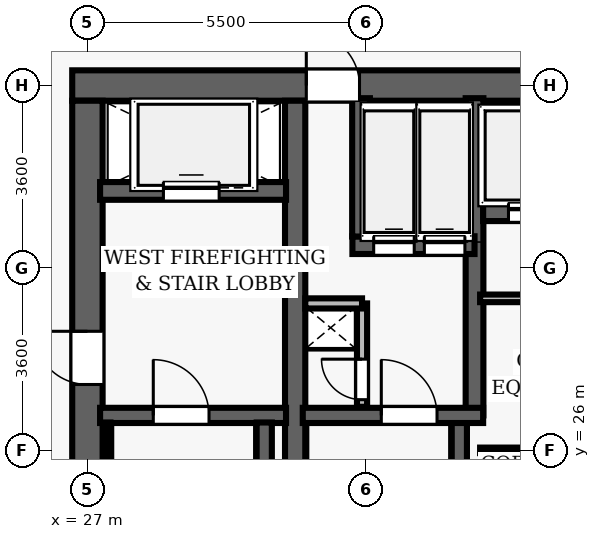
"""IFC4 building model, lengths in metres.
Left out: names, types, materials, properties, quantities, classifications, styles, units other than length and angle.
Written with IfcOpenShell. Run it as: python <this file> out.ifc"""

import sys

from ifc_helpers import new_model, si_unit, direction, frame, frame_2d, origin, place, context, subcontext, project, spatial, rectangle, extrude, element, fill, save


model = new_model("IFC4")
c1 = context("Model", 3, precision=1e-05, world=origin(), true_north=direction((0.0, 1.0)))
c2 = subcontext(c1, "Body", "Model", "MODEL_VIEW")
j1 = project(units=[si_unit("LENGTHUNIT", "METRE"), si_unit("PLANEANGLEUNIT", "RADIAN")], contexts=[c1])
p1 = place(None, origin())
s1 = spatial("IfcSite", under=j1, at=p1, CompositionType="ELEMENT")
p2 = place(p1, origin())
s2 = spatial("IfcBuilding", under=s1, at=p2, CompositionType="ELEMENT")
p3 = place(p2, frame((0.0, 0.0, 79.9)))
s3 = spatial("IfcBuildingStorey", under=s2, at=p3, CompositionType="ELEMENT", Elevation=79.9)
p4 = place(p3, frame((26.7, 33.2, 0.0), z_axis=(0.0, 0.0, 1.0), x_axis=(1.0, 0.0, 0.0)))
e1 = element("IfcWall", 1, at=p4, inside=s3, PredefinedType="SHEAR", context=c2, shape_type="SweptSolid", body=[
    extrude(rectangle(XDim=22.6, YDim=0.6, at=frame_2d((11.3, 0.0))), origin(), (0.0, 0.0, 1.0), 3.5),
])
p5 = place(p4, frame((4.62, 0.0, 0.0)))
e2 = element("IfcOpeningElement", 2, at=p5, cuts=e1, PredefinedType="OPENING", context=c2, shape_type="SweptSolid", body=[
    extrude(rectangle(XDim=1.05, YDim=2.15, at=frame_2d((0.525, 1.075))), frame((0.0, 0.31, 0.0), z_axis=(0.0, -1.0, 0.0), x_axis=(1.0, 0.0, 0.0)), (0.0, 0.0, 1.0), 0.62),
])
p6 = place(p4, frame((14.52, 0.0, 0.0)))
e3 = element("IfcOpeningElement", 3, at=p6, cuts=e1, PredefinedType="OPENING", context=c2, shape_type="SweptSolid", body=[
    extrude(rectangle(XDim=1.05, YDim=2.15, at=frame_2d((0.525, 1.075))), frame((0.0, 0.31, 0.0), z_axis=(0.0, -1.0, 0.0), x_axis=(1.0, 0.0, 0.0)), (0.0, 0.0, 1.0), 0.62),
])
p7 = place(p3, frame((27.0, 19.1, 0.0), z_axis=(0.0, 0.0, 1.0), x_axis=(0.0, 1.0, 0.0)))
e4 = element("IfcWall", 4, at=p7, inside=s3, PredefinedType="SHEAR", context=c2, shape_type="SweptSolid", body=[
    extrude(rectangle(XDim=13.8, YDim=0.6, at=frame_2d((6.9, 0.0))), origin(), (0.0, 0.0, 1.0), 3.5),
])
p8 = place(p7, frame((8.2, 0.0, 0.0)))
e5 = element("IfcOpeningElement", 5, at=p8, cuts=e4, PredefinedType="OPENING", context=c2, shape_type="SweptSolid", body=[
    extrude(rectangle(XDim=1.05, YDim=2.15, at=frame_2d((0.525, 1.075))), frame((0.0, 0.31, 0.0), z_axis=(0.0, -1.0, 0.0), x_axis=(1.0, 0.0, 0.0)), (0.0, 0.0, 1.0), 0.62),
])
p9 = place(p3, frame((31.1, 19.1, 0.0), z_axis=(0.0, 0.0, 1.0), x_axis=(0.0, 1.0, 0.0)))
e6 = element("IfcWall", 6, at=p9, inside=s3, PredefinedType="SHEAR", context=c2, shape_type="SweptSolid", body=[
    extrude(rectangle(XDim=13.8, YDim=0.4, at=frame_2d((6.9, 0.0))), origin(), (0.0, 0.0, 1.0), 3.5),
])
p10 = place(p3, frame((27.25, 26.69, 0.0), z_axis=(0.0, 0.0, 1.0), x_axis=(1.0, 0.0, 0.0)))
e7 = element("IfcWall", 7, at=p10, inside=s3, PredefinedType="SHEAR", context=c2, shape_type="SweptSolid", body=[
    extrude(rectangle(XDim=3.67, YDim=0.3, at=frame_2d((1.835, 0.0))), origin(), (0.0, 0.0, 1.0), 3.5),
])
p11 = place(p10, frame((1.05, 0.0, 0.0)))
e8 = element("IfcOpeningElement", 8, at=p11, cuts=e7, PredefinedType="OPENING", context=c2, shape_type="SweptSolid", body=[
    extrude(rectangle(XDim=1.1, YDim=2.15, at=frame_2d((0.55, 1.075))), frame((0.0, 0.16, 0.0), z_axis=(0.0, -1.0, 0.0), x_axis=(1.0, 0.0, 0.0)), (0.0, 0.0, 1.0), 0.32),
])
p12 = place(p3, frame((30.49, 19.05, 0.0), z_axis=(0.0, 0.0, 1.0), x_axis=(0.0, 1.0, 0.0)))
e9 = element("IfcWall", 9, at=p12, inside=s3, PredefinedType="SHEAR", context=c2, shape_type="SweptSolid", body=[
    extrude(rectangle(XDim=7.5, YDim=0.3, at=frame_2d((3.75, 0.0))), origin(), (0.0, 0.0, 1.0), 3.5),
])
p13 = place(p3, frame((27.395, 19.1, 0.0), z_axis=(0.0, 0.0, 1.0), x_axis=(0.0, 1.0, 0.0)))
e10 = element("IfcWall", 10, at=p13, inside=s3, PredefinedType="SHEAR", context=c2, shape_type="SweptSolid", body=[
    extrude(rectangle(XDim=7.45, YDim=0.12, at=frame_2d((3.725, 0.0))), origin(), (0.0, 0.0, 1.0), 3.5),
])
p14 = place(p3, frame((27.25, 31.12, 0.0), z_axis=(0.0, 0.0, 1.0), x_axis=(1.0, 0.0, 0.0)))
e11 = element("IfcWall", 11, at=p14, inside=s3, PredefinedType="SHEAR", context=c2, shape_type="SweptSolid", body=[
    extrude(rectangle(XDim=3.67, YDim=0.35, at=frame_2d((1.835, 0.0))), origin(), (0.0, 0.0, 1.0), 2.6),
])
p15 = place(p14, frame((1.25, 0.0, 0.0)))
e12 = element("IfcOpeningElement", 12, at=p15, cuts=e11, PredefinedType="OPENING", context=c2, shape_type="SweptSolid", body=[
    extrude(rectangle(XDim=1.1, YDim=2.15, at=frame_2d((0.55, 1.075))), frame((0.0, 0.185, 0.0), z_axis=(0.0, -1.0, 0.0), x_axis=(1.0, 0.0, 0.0)), (0.0, 0.0, 1.0), 0.37),
])
p16 = place(p3, frame((34.34, 19.05, 0.0), z_axis=(0.0, 0.0, 1.0), x_axis=(0.0, 1.0, 0.0)))
e13 = element("IfcWall", 13, at=p16, inside=s3, PredefinedType="SHEAR", context=c2, shape_type="SweptSolid", body=[
    extrude(rectangle(XDim=7.5, YDim=0.3, at=frame_2d((3.75, 0.0))), origin(), (0.0, 0.0, 1.0), 3.5),
])
p17 = place(p3, frame((34.64, 26.69, 0.0), z_axis=(0.0, 0.0, 1.0), x_axis=(0.0, 1.0, 0.0)))
e14 = element("IfcWall", 14, at=p17, inside=s3, PredefinedType="SHEAR", context=c2, shape_type="SweptSolid", body=[
    extrude(rectangle(XDim=6.26, YDim=0.35, at=frame_2d((3.13, 0.0))), origin(), (0.0, 0.0, 1.0), 3.5),
])
p18 = place(p3, frame((31.25, 26.69, 0.0), z_axis=(0.0, 0.0, 1.0), x_axis=(1.0, 0.0, 0.0)))
e15 = element("IfcWall", 15, at=p18, inside=s3, PredefinedType="SHEAR", context=c2, shape_type="SweptSolid", body=[
    extrude(rectangle(XDim=3.56, YDim=0.3, at=frame_2d((1.78, 0.0))), origin(), (0.0, 0.0, 1.0), 3.5),
])
p19 = place(p18, frame((1.55, 0.0, 0.0)))
e16 = element("IfcOpeningElement", 16, at=p19, cuts=e15, PredefinedType="OPENING", context=c2, shape_type="SweptSolid", body=[
    extrude(rectangle(XDim=1.1, YDim=2.15, at=frame_2d((0.55, 1.075))), frame((0.0, 0.16, 0.0), z_axis=(0.0, -1.0, 0.0), x_axis=(1.0, 0.0, 0.0)), (0.0, 0.0, 1.0), 0.32),
])
p20 = place(p3, frame((32.23, 30.05, 0.0), z_axis=(0.0, 0.0, 1.0), x_axis=(1.0, 0.0, 0.0)))
e17 = element("IfcWall", 17, at=p20, inside=s3, PredefinedType="SHEAR", context=c2, shape_type="SweptSolid", body=[
    extrude(rectangle(XDim=2.41, YDim=0.35, at=frame_2d((1.205, 0.0))), origin(), (0.0, 0.0, 1.0), 2.6),
])
p21 = place(p20, frame((0.42, 0.0, 0.0)))
e18 = element("IfcOpeningElement", 18, at=p21, cuts=e17, PredefinedType="OPENING", context=c2, shape_type="SweptSolid", body=[
    extrude(rectangle(XDim=0.8, YDim=2.15, at=frame_2d((0.4, 1.075))), frame((0.0, 0.185, 0.0), z_axis=(0.0, -1.0, 0.0), x_axis=(1.0, 0.0, 0.0)), (0.0, 0.0, 1.0), 0.37),
])
p22 = place(p20, frame((1.42, 0.0, 0.0)))
e19 = element("IfcOpeningElement", 19, at=p22, cuts=e17, PredefinedType="OPENING", context=c2, shape_type="SweptSolid", body=[
    extrude(rectangle(XDim=0.8, YDim=2.15, at=frame_2d((0.4, 1.075))), frame((0.0, 0.185, 0.0), z_axis=(0.0, -1.0, 0.0), x_axis=(1.0, 0.0, 0.0)), (0.0, 0.0, 1.0), 0.37),
])
p23 = place(p3, frame((32.4, 30.22, 0.0), z_axis=(0.0, 0.0, 1.0), x_axis=(0.0, 1.0, 0.0)))
e20 = element("IfcWall", 20, at=p23, inside=s3, PredefinedType="SHEAR", context=c2, shape_type="SweptSolid", body=[
    extrude(rectangle(XDim=2.73, YDim=0.35, at=frame_2d((1.365, 0.0))), origin(), (0.0, 0.0, 1.0), 2.6),
])
p24 = place(p3, frame((32.42, 26.86, 0.0), z_axis=(0.0, 0.0, 1.0), x_axis=(0.0, 1.0, 0.0)))
e21 = element("IfcWall", 21, at=p24, inside=s3, PredefinedType="PARTITIONING", context=c2, shape_type="SweptSolid", body=[
    extrude(rectangle(XDim=2.04, YDim=0.2, at=frame_2d((1.02, 0.0))), origin(), (0.0, 0.0, 1.0), 2.6),
])
p25 = place(p24, frame((0.14, 0.0, 0.0)))
e22 = element("IfcOpeningElement", 22, at=p25, cuts=e21, PredefinedType="OPENING", context=c2, shape_type="SweptSolid", body=[
    extrude(rectangle(XDim=0.8, YDim=2.05, at=frame_2d((0.4, 1.025))), frame((0.0, 0.11, 0.0), z_axis=(0.0, -1.0, 0.0), x_axis=(1.0, 0.0, 0.0)), (0.0, 0.0, 1.0), 0.22),
])
p26 = place(p3, frame((31.3, 28.9, 0.0), z_axis=(0.0, 0.0, 1.0), x_axis=(1.0, 0.0, 0.0)))
e23 = element("IfcWall", 23, at=p26, inside=s3, PredefinedType="PARTITIONING", context=c2, shape_type="SweptSolid", body=[
    extrude(rectangle(XDim=1.12, YDim=0.2, at=frame_2d((0.56, 0.0))), origin(), (0.0, 0.0, 1.0), 2.6),
])
p27 = place(p3, frame((34.81, 30.7, 0.0), z_axis=(0.0, 0.0, 1.0), x_axis=(1.0, 0.0, 0.0)))
e24 = element("IfcWall", 24, at=p27, inside=s3, PredefinedType="SHEAR", context=c2, shape_type="SweptSolid", body=[
    extrude(rectangle(XDim=6.36, YDim=0.35, at=frame_2d((3.18, 0.0))), origin(), (0.0, 0.0, 1.0), 2.6),
])
p28 = place(p27, frame((0.5, 0.0, 0.0)))
e25 = element("IfcOpeningElement", 25, at=p28, cuts=e24, PredefinedType="OPENING", context=c2, shape_type="SweptSolid", body=[
    extrude(rectangle(XDim=0.9, YDim=2.15, at=frame_2d((0.45, 1.075))), frame((0.0, 0.185, 0.0), z_axis=(0.0, -1.0, 0.0), x_axis=(1.0, 0.0, 0.0)), (0.0, 0.0, 1.0), 0.37),
])
p29 = place(p27, frame((2.58, 0.0, 0.0)))
e26 = element("IfcOpeningElement", 26, at=p29, cuts=e24, PredefinedType="OPENING", context=c2, shape_type="SweptSolid", body=[
    extrude(rectangle(XDim=0.9, YDim=2.15, at=frame_2d((0.45, 1.075))), frame((0.0, 0.185, 0.0), z_axis=(0.0, -1.0, 0.0), x_axis=(1.0, 0.0, 0.0)), (0.0, 0.0, 1.0), 0.37),
])
p30 = place(p27, frame((4.66, 0.0, 0.0)))
e27 = element("IfcOpeningElement", 27, at=p30, cuts=e24, PredefinedType="OPENING", context=c2, shape_type="SweptSolid", body=[
    extrude(rectangle(XDim=0.9, YDim=2.15, at=frame_2d((0.45, 1.075))), frame((0.0, 0.185, 0.0), z_axis=(0.0, -1.0, 0.0), x_axis=(1.0, 0.0, 0.0)), (0.0, 0.0, 1.0), 0.37),
])
p31 = place(p3, frame((34.75, 29.0, 0.0), z_axis=(0.0, 0.0, 1.0), x_axis=(1.0, 0.0, 0.0)))
e28 = element("IfcWall", 28, at=p31, inside=s3, PredefinedType="PARTITIONING", context=c2, shape_type="SweptSolid", body=[
    extrude(rectangle(XDim=6.25, YDim=0.15, at=frame_2d((3.125, 0.0))), origin(), (0.0, 0.0, 1.0), 2.6),
])
p32 = place(p3, frame((34.75, 26.0, 0.0), z_axis=(0.0, 0.0, 1.0), x_axis=(1.0, 0.0, 0.0)))
e29 = element("IfcWall", 29, at=p32, inside=s3, PredefinedType="PARTITIONING", context=c2, shape_type="SweptSolid", body=[
    extrude(rectangle(XDim=6.25, YDim=0.11, at=frame_2d((3.125, 0.0))), origin(), (0.0, 0.0, 1.0), 2.6),
])
p33 = place(p11, origin())
e30 = element("IfcDoor", 30, at=p33, inside=s3, OperationType="SINGLE_SWING_LEFT", PredefinedType="DOOR", context=c2, shape_type="SweptSolid", body=[
    extrude(rectangle(XDim=1.1, YDim=2.15, at=frame_2d((0.55, 1.075))), frame((0.0, 0.025, 0.0), z_axis=(0.0, -1.0, 0.0), x_axis=(1.0, 0.0, 0.0)), (0.0, 0.0, 1.0), 0.05),
])
fill(e8, e30)
p34 = place(p8, origin())
e31 = element("IfcDoor", 31, at=p34, inside=s3, OperationType="SINGLE_SWING_RIGHT", PredefinedType="DOOR", context=c2, shape_type="SweptSolid", body=[
    extrude(rectangle(XDim=1.05, YDim=2.15, at=frame_2d((0.525, 1.075))), frame((0.0, 0.025, 0.0), z_axis=(0.0, -1.0, 0.0), x_axis=(1.0, 0.0, 0.0)), (0.0, 0.0, 1.0), 0.05),
])
fill(e5, e31)
p35 = place(p19, origin())
e32 = element("IfcDoor", 32, at=p35, inside=s3, OperationType="SINGLE_SWING_LEFT", PredefinedType="DOOR", context=c2, shape_type="SweptSolid", body=[
    extrude(rectangle(XDim=1.1, YDim=2.15, at=frame_2d((0.55, 1.075))), frame((0.0, 0.025, 0.0), z_axis=(0.0, -1.0, 0.0), x_axis=(1.0, 0.0, 0.0)), (0.0, 0.0, 1.0), 0.05),
])
fill(e16, e32)
p36 = place(p25, origin())
e33 = element("IfcDoor", 33, at=p36, inside=s3, OperationType="SINGLE_SWING_RIGHT", PredefinedType="DOOR", context=c2, shape_type="SweptSolid", body=[
    extrude(rectangle(XDim=0.8, YDim=2.05, at=frame_2d((0.4, 1.025))), frame((0.0, 0.025, 0.0), z_axis=(0.0, -1.0, 0.0), x_axis=(1.0, 0.0, 0.0)), (0.0, 0.0, 1.0), 0.05),
])
fill(e22, e33)
p37 = place(p5, origin())
e34 = element("IfcDoor", 34, at=p37, inside=s3, OperationType="SINGLE_SWING_LEFT", PredefinedType="DOOR", context=c2, shape_type="SweptSolid", body=[
    extrude(rectangle(XDim=1.05, YDim=2.15, at=frame_2d((0.525, 1.075))), frame((0.0, 0.025, 0.0), z_axis=(0.0, -1.0, 0.0), x_axis=(1.0, 0.0, 0.0)), (0.0, 0.0, 1.0), 0.05),
])
fill(e2, e34)
p38 = place(p28, origin())
e35 = element("IfcDoor", 35, at=p38, inside=s3, OperationType="SLIDING_TO_LEFT", PredefinedType="DOOR", context=c2, shape_type="SweptSolid", body=[
    extrude(rectangle(XDim=0.9, YDim=2.15, at=frame_2d((0.45, 1.075))), frame((0.0, 0.025, 0.0), z_axis=(0.0, -1.0, 0.0), x_axis=(1.0, 0.0, 0.0)), (0.0, 0.0, 1.0), 0.05),
])
fill(e25, e35)
p39 = place(p15, origin())
e36 = element("IfcDoor", 36, at=p39, inside=s3, OperationType="SLIDING_TO_LEFT", PredefinedType="DOOR", context=c2, shape_type="SweptSolid", body=[
    extrude(rectangle(XDim=1.1, YDim=2.15, at=frame_2d((0.55, 1.075))), frame((0.0, 0.025, 0.0), z_axis=(0.0, -1.0, 0.0), x_axis=(1.0, 0.0, 0.0)), (0.0, 0.0, 1.0), 0.05),
])
fill(e12, e36)
p40 = place(p21, origin())
e37 = element("IfcDoor", 37, at=p40, inside=s3, OperationType="SLIDING_TO_LEFT", PredefinedType="DOOR", context=c2, shape_type="SweptSolid", body=[
    extrude(rectangle(XDim=0.8, YDim=2.15, at=frame_2d((0.4, 1.075))), frame((0.0, 0.025, 0.0), z_axis=(0.0, -1.0, 0.0), x_axis=(1.0, 0.0, 0.0)), (0.0, 0.0, 1.0), 0.05),
])
fill(e18, e37)
p41 = place(p22, origin())
e38 = element("IfcDoor", 38, at=p41, inside=s3, OperationType="SLIDING_TO_LEFT", PredefinedType="DOOR", context=c2, shape_type="SweptSolid", body=[
    extrude(rectangle(XDim=0.8, YDim=2.15, at=frame_2d((0.4, 1.075))), frame((0.0, 0.025, 0.0), z_axis=(0.0, -1.0, 0.0), x_axis=(1.0, 0.0, 0.0)), (0.0, 0.0, 1.0), 0.05),
])
fill(e19, e38)
save(model, sys.argv[1])
